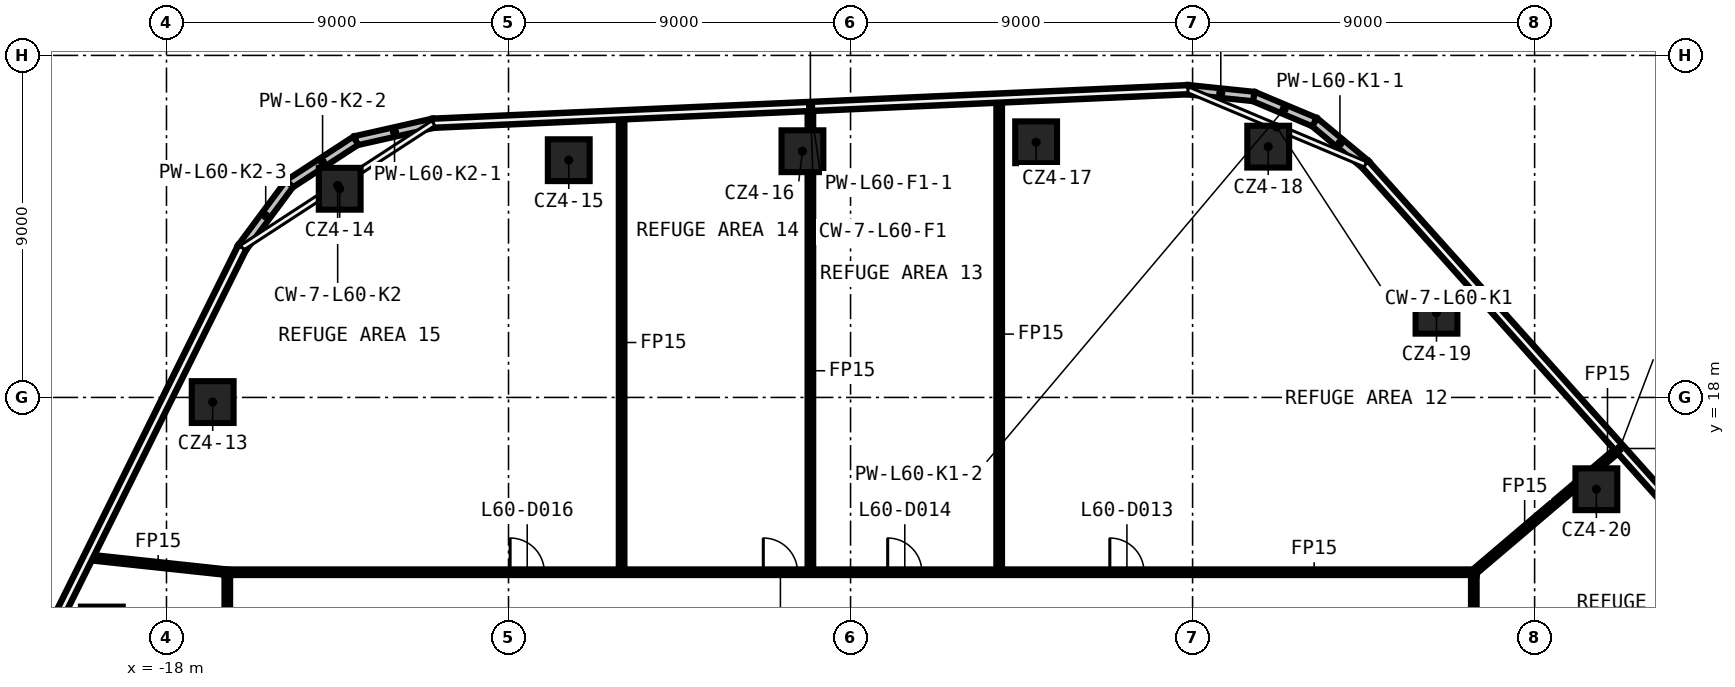
"""IFC4 building model, lengths in metres.
Left out: names, types, materials, properties, quantities, classifications, styles, units other than length and angle.
Written with IfcOpenShell. Run it as: python <this file> out.ifc"""

import sys

from ifc_helpers import new_model, si_unit, direction, frame, frame_2d, origin, origin_2d, place, context, subcontext, project, spatial, rectangle, extrude, element, fill, save


model = new_model("IFC4")
c1 = context("Model", 3, precision=1e-05, world=origin(), true_north=direction((0.0, 1.0)))
c2 = subcontext(c1, "Body", "Model", "MODEL_VIEW")
j1 = project(units=[si_unit("LENGTHUNIT", "METRE"), si_unit("PLANEANGLEUNIT", "RADIAN")], contexts=[c1])
p1 = place(None, origin())
s1 = spatial("IfcSite", under=j1, at=p1, CompositionType="ELEMENT")
p2 = place(p1, origin())
s2 = spatial("IfcBuilding", under=s1, at=p2, CompositionType="ELEMENT")
p3 = place(p2, frame((0.0, 0.0, 283.2)))
s3 = spatial("IfcBuildingStorey", under=s2, at=p3, CompositionType="ELEMENT", Elevation=283.2)
for number, where, z_axis, x_axis in (
    (1, (-19.702, 11.945, 0.0), (0.0, 0.0, 1.0), (1.0, 0.0, 0.0)),
    (2, (-16.784, 17.878, 0.0), (0.0, 0.0, 1.0), (1.0, 0.0, 0.0)),
    (3, (-13.442, 23.491, 0.0), (0.0, 0.0, 1.0), (1.0, 0.0, 0.0)),
    (4, (-7.415, 24.243, 0.0), (0.0, 0.0, 1.0), (1.0, 0.0, 0.0)),
    (5, (-1.266, 24.479, 0.0), (0.0, 0.0, 1.0), (1.0, 0.0, 0.0)),
    (6, (4.883, 24.714, 0.0), (0.0, 0.0, 1.0), (1.0, 0.0, 0.0)),
    (7, (10.99, 24.599, 0.0), (0.0, 0.0, 1.0), (1.0, 0.0, 0.0)),
    (8, (15.418, 20.229, 0.0), (0.0, 0.0, 1.0), (1.0, 0.0, 0.0)),
    (9, (19.625, 15.584, 0.0), (0.0, 0.0, 1.0), (1.0, 0.0, 0.0)),
):
    element("IfcColumn", number, at=place(p3, frame(where, z_axis=z_axis, x_axis=x_axis)), inside=s3, PredefinedType="COLUMN", context=c2, shape_type="SweptSolid", body=[
        extrude(rectangle(XDim=1.1, YDim=1.1, at=origin_2d()), origin(), (0.0, 0.0, 1.0), 5.55),
    ])
p4 = place(p3, frame((-16.475, 13.4, 0.0), z_axis=(0.0, 0.0, 1.0), x_axis=(1.0, 0.0, 0.0)))
e10 = element("IfcWall", 10, at=p4, inside=s3, PredefinedType="PARTITIONING", context=c2, shape_type="SweptSolid", body=[
    extrude(rectangle(XDim=32.95, YDim=0.15, at=frame_2d((16.475, 0.0))), origin(), (0.0, 0.0, 1.0), 5.55),
])
p5 = place(p4, frame((23.297, 0.0, 0.0)))
e11 = element("IfcOpeningElement", 11, at=p5, cuts=e10, PredefinedType="OPENING", context=c2, shape_type="SweptSolid", body=[
    extrude(rectangle(XDim=0.9, YDim=2.1, at=frame_2d((0.45, 1.05))), frame((0.0, 0.085, 0.0), z_axis=(0.0, -1.0, 0.0), x_axis=(1.0, 0.0, 0.0)), (0.0, 0.0, 1.0), 0.17),
])
p6 = place(p4, frame((17.452, 0.0, 0.0)))
e12 = element("IfcOpeningElement", 12, at=p6, cuts=e10, PredefinedType="OPENING", context=c2, shape_type="SweptSolid", body=[
    extrude(rectangle(XDim=0.9, YDim=2.1, at=frame_2d((0.45, 1.05))), frame((0.0, 0.085, 0.0), z_axis=(0.0, -1.0, 0.0), x_axis=(1.0, 0.0, 0.0)), (0.0, 0.0, 1.0), 0.17),
])
p7 = place(p4, frame((14.179, 0.0, 0.0)))
e13 = element("IfcOpeningElement", 13, at=p7, cuts=e10, PredefinedType="OPENING", context=c2, shape_type="SweptSolid", body=[
    extrude(rectangle(XDim=0.9, YDim=2.1, at=frame_2d((0.45, 1.05))), frame((0.0, 0.085, 0.0), z_axis=(0.0, -1.0, 0.0), x_axis=(1.0, 0.0, 0.0)), (0.0, 0.0, 1.0), 0.17),
])
p8 = place(p4, frame((7.517, 0.0, 0.0)))
e14 = element("IfcOpeningElement", 14, at=p8, cuts=e10, PredefinedType="OPENING", context=c2, shape_type="SweptSolid", body=[
    extrude(rectangle(XDim=0.9, YDim=2.1, at=frame_2d((0.45, 1.05))), frame((0.0, 0.085, 0.0), z_axis=(0.0, -1.0, 0.0), x_axis=(1.0, 0.0, 0.0)), (0.0, 0.0, 1.0), 0.17),
])
p9 = place(p3, frame((16.4, 13.4, 0.0), z_axis=(0.0, 0.0, 1.0), x_axis=(0.761994228547, 0.647583813618, 0.0)))
e15 = element("IfcWall", 15, at=p9, inside=s3, PredefinedType="PARTITIONING", context=c2, shape_type="SweptSolid", body=[
    extrude(rectangle(XDim=3.51, YDim=0.15, at=frame_2d((1.755, 0.0))), origin(), (0.0, 0.0, 1.0), 5.55),
])
p10 = place(p3, frame((19.617, 16.134, 0.0), z_axis=(0.0, 0.0, 1.0), x_axis=(0.762069188158, 0.647495600341, 0.0)))
e16 = element("IfcWall", 16, at=p10, inside=s3, PredefinedType="PARTITIONING", context=c2, shape_type="SweptSolid", body=[
    extrude(rectangle(XDim=0.788, YDim=0.15, at=frame_2d((0.394, 0.0))), origin(), (0.0, 0.0, 1.0), 5.55),
])
p11 = place(p3, frame((16.4, 13.325, 0.0), z_axis=(0.0, 0.0, 1.0), x_axis=(0.0, -1.0, 0.0)))
e17 = element("IfcWall", 17, at=p11, inside=s3, PredefinedType="PARTITIONING", context=c2, shape_type="SweptSolid", body=[
    extrude(rectangle(XDim=26.65, YDim=0.15, at=frame_2d((13.325, 0.0))), origin(), (0.0, 0.0, 1.0), 5.55),
])
p12 = place(p11, frame((20.273, 0.0, 0.0)))
e18 = element("IfcOpeningElement", 18, at=p12, cuts=e17, PredefinedType="OPENING", context=c2, shape_type="SweptSolid", body=[
    extrude(rectangle(XDim=0.9, YDim=2.1, at=frame_2d((0.45, 1.05))), frame((0.0, 0.085, 0.0), z_axis=(0.0, -1.0, 0.0), x_axis=(1.0, 0.0, 0.0)), (0.0, 0.0, 1.0), 0.17),
])
p13 = place(p11, frame((16.375, 0.0, 0.0)))
e19 = element("IfcOpeningElement", 19, at=p13, cuts=e17, PredefinedType="OPENING", context=c2, shape_type="SweptSolid", body=[
    extrude(rectangle(XDim=0.9, YDim=2.1, at=frame_2d((0.45, 1.05))), frame((0.0, 0.085, 0.0), z_axis=(0.0, -1.0, 0.0), x_axis=(1.0, 0.0, 0.0)), (0.0, 0.0, 1.0), 0.17),
])
p14 = place(p11, frame((10.108, 0.0, 0.0)))
e20 = element("IfcOpeningElement", 20, at=p14, cuts=e17, PredefinedType="OPENING", context=c2, shape_type="SweptSolid", body=[
    extrude(rectangle(XDim=0.9, YDim=2.1, at=frame_2d((0.45, 1.05))), frame((0.0, 0.085, 0.0), z_axis=(0.0, -1.0, 0.0), x_axis=(1.0, 0.0, 0.0)), (0.0, 0.0, 1.0), 0.17),
])
p15 = place(p11, frame((2.579, 0.0, 0.0)))
e21 = element("IfcOpeningElement", 21, at=p15, cuts=e17, PredefinedType="OPENING", context=c2, shape_type="SweptSolid", body=[
    extrude(rectangle(XDim=0.9, YDim=2.1, at=frame_2d((0.45, 1.05))), frame((0.0, 0.085, 0.0), z_axis=(0.0, -1.0, 0.0), x_axis=(1.0, 0.0, 0.0)), (0.0, 0.0, 1.0), 0.17),
])
p16 = place(p3, frame((3.911, 13.475, 0.0), z_axis=(0.0, 0.0, 1.0), x_axis=(0.0, 1.0, 0.0)))
e22 = element("IfcWall", 22, at=p16, inside=s3, PredefinedType="PARTITIONING", context=c2, shape_type="SweptSolid", body=[
    extrude(rectangle(XDim=12.383, YDim=0.15, at=frame_2d((6.191, 0.0))), origin(), (0.0, 0.0, 1.0), 5.55),
])
p17 = place(p3, frame((-1.057, 13.475, 0.0), z_axis=(0.0, 0.0, 1.0), x_axis=(0.0, 1.0, 0.0)))
e23 = element("IfcWall", 23, at=p17, inside=s3, PredefinedType="PARTITIONING", context=c2, shape_type="SweptSolid", body=[
    extrude(rectangle(XDim=10.454, YDim=0.15, at=frame_2d((5.227, 0.0))), origin(), (0.0, 0.0, 1.0), 5.55),
])
p18 = place(p3, frame((-1.057, 25.029, 0.0), z_axis=(0.0, 0.0, 1.0), x_axis=(0.0, 1.0, 0.0)))
e24 = element("IfcWall", 24, at=p18, inside=s3, PredefinedType="PARTITIONING", context=c2, shape_type="SweptSolid", body=[
    extrude(rectangle(XDim=0.608, YDim=0.15, at=frame_2d((0.304, 0.0))), origin(), (0.0, 0.0, 1.0), 5.55),
])
p19 = place(p3, frame((-6.024, 13.475, 0.0), z_axis=(0.0, 0.0, 1.0), x_axis=(0.0, 1.0, 0.0)))
e25 = element("IfcWall", 25, at=p19, inside=s3, PredefinedType="PARTITIONING", context=c2, shape_type="SweptSolid", body=[
    extrude(rectangle(XDim=11.941, YDim=0.15, at=frame_2d((5.97, 0.0))), origin(), (0.0, 0.0, 1.0), 5.55),
])
p20 = place(p3, frame((-16.4, -13.325, 0.0), z_axis=(0.0, 0.0, 1.0), x_axis=(0.0, 1.0, 0.0)))
e26 = element("IfcWall", 26, at=p20, inside=s3, PredefinedType="PARTITIONING", context=c2, shape_type="SweptSolid", body=[
    extrude(rectangle(XDim=26.65, YDim=0.15, at=frame_2d((13.325, 0.0))), origin(), (0.0, 0.0, 1.0), 5.55),
])
p21 = place(p20, frame((10.903, 0.0, 0.0)))
e27 = element("IfcOpeningElement", 27, at=p21, cuts=e26, PredefinedType="OPENING", context=c2, shape_type="SweptSolid", body=[
    extrude(rectangle(XDim=0.9, YDim=2.1, at=frame_2d((0.45, 1.05))), frame((0.0, 0.085, 0.0), z_axis=(0.0, -1.0, 0.0), x_axis=(1.0, 0.0, 0.0)), (0.0, 0.0, 1.0), 0.17),
])
p22 = place(p20, frame((3.885, 0.0, 0.0)))
e28 = element("IfcOpeningElement", 28, at=p22, cuts=e26, PredefinedType="OPENING", context=c2, shape_type="SweptSolid", body=[
    extrude(rectangle(XDim=0.9, YDim=2.1, at=frame_2d((0.45, 1.05))), frame((0.0, 0.085, 0.0), z_axis=(0.0, -1.0, 0.0), x_axis=(1.0, 0.0, 0.0)), (0.0, 0.0, 1.0), 0.17),
])
p23 = place(p20, frame((22.384, 0.0, 0.0)))
e29 = element("IfcOpeningElement", 29, at=p23, cuts=e26, PredefinedType="OPENING", context=c2, shape_type="SweptSolid", body=[
    extrude(rectangle(XDim=0.9, YDim=2.1, at=frame_2d((0.45, 1.05))), frame((0.0, 0.085, 0.0), z_axis=(0.0, -1.0, 0.0), x_axis=(1.0, 0.0, 0.0)), (0.0, 0.0, 1.0), 0.17),
])
p24 = place(p20, frame((15.37, 0.0, 0.0)))
e30 = element("IfcOpeningElement", 30, at=p24, cuts=e26, PredefinedType="OPENING", context=c2, shape_type="SweptSolid", body=[
    extrude(rectangle(XDim=0.9, YDim=2.1, at=frame_2d((0.45, 1.05))), frame((0.0, 0.085, 0.0), z_axis=(0.0, -1.0, 0.0), x_axis=(1.0, 0.0, 0.0)), (0.0, 0.0, 1.0), 0.17),
])
p25 = place(p3, frame((-20.039, 13.791, 0.0), z_axis=(0.0, 0.0, 1.0), x_axis=(0.994280601319, -0.106799278277, 0.0)))
e31 = element("IfcWall", 31, at=p25, inside=s3, PredefinedType="PARTITIONING", context=c2, shape_type="SweptSolid", body=[
    extrude(rectangle(XDim=3.66, YDim=0.15, at=frame_2d((1.83, 0.0))), origin(), (0.0, 0.0, 1.0), 5.55),
])
p26 = place(p3, frame((26.921, 9.18, 0.0), z_axis=(0.0, 0.0, 1.0), x_axis=(-0.666670693315, 0.745352390936, 0.0)))
e32 = element("IfcWall", 32, at=p26, inside=s3, PredefinedType="SOLIDWALL", context=c2, shape_type="SweptSolid", body=[
    extrude(rectangle(XDim=20.06, YDim=0.25, at=frame_2d((10.03, 0.0))), origin(), (0.0, 0.0, 1.0), 5.55),
])
p27 = place(p3, frame((13.548, 24.132, 0.0), z_axis=(0.0, 0.0, 1.0), x_axis=(-0.769001728145, 0.639246698943, 0.0)))
e33 = element("IfcWall", 33, at=p27, inside=s3, PredefinedType="SOLIDWALL", context=c2, shape_type="SweptSolid", body=[
    extrude(rectangle(XDim=1.742, YDim=0.25, at=frame_2d((0.871, 0.0))), origin(), (0.0, 0.0, 1.0), 5.55),
])
p28 = place(p3, frame((12.208, 25.246, 0.0), z_axis=(0.0, 0.0, 1.0), x_axis=(-0.921730707326, 0.387830508304, 0.0)))
e34 = element("IfcWall", 34, at=p28, inside=s3, PredefinedType="SOLIDWALL", context=c2, shape_type="SweptSolid", body=[
    extrude(rectangle(XDim=1.735, YDim=0.25, at=frame_2d((0.867, 0.0))), origin(), (0.0, 0.0, 1.0), 5.55),
])
p29 = place(p3, frame((10.609, 25.919, 0.0), z_axis=(0.0, 0.0, 1.0), x_axis=(-0.99468140225, 0.102999553487, 0.0)))
e35 = element("IfcWall", 35, at=p29, inside=s3, PredefinedType="SOLIDWALL", context=c2, shape_type="SweptSolid", body=[
    extrude(rectangle(XDim=1.742, YDim=0.25, at=frame_2d((0.871, 0.0))), origin(), (0.0, 0.0, 1.0), 5.55),
])
p30 = place(p3, frame((8.876, 26.098, 0.0), z_axis=(0.0, 0.0, 1.0), x_axis=(-0.999012910202, -0.044420774975, 0.0)))
e36 = element("IfcWall", 36, at=p30, inside=s3, PredefinedType="SOLIDWALL", context=c2, shape_type="SweptSolid", body=[
    extrude(rectangle(XDim=19.874, YDim=0.25, at=frame_2d((9.937, 0.0))), origin(), (0.0, 0.0, 1.0), 5.55),
])
p31 = place(p3, frame((-10.979, 25.216, 0.0), z_axis=(0.0, 0.0, 1.0), x_axis=(-0.975459598357, -0.220178500251, 0.0)))
e37 = element("IfcWall", 37, at=p31, inside=s3, PredefinedType="SOLIDWALL", context=c2, shape_type="SweptSolid", body=[
    extrude(rectangle(XDim=2.092, YDim=0.25, at=frame_2d((1.046, 0.0))), origin(), (0.0, 0.0, 1.0), 5.55),
])
p32 = place(p3, frame((-13.02, 24.755, 0.0), z_axis=(0.0, 0.0, 1.0), x_axis=(-0.838111469167, -0.545499005729, 0.0)))
e38 = element("IfcWall", 38, at=p32, inside=s3, PredefinedType="SOLIDWALL", context=c2, shape_type="SweptSolid", body=[
    extrude(rectangle(XDim=2.083, YDim=0.25, at=frame_2d((1.042, 0.0))), origin(), (0.0, 0.0, 1.0), 5.55),
])
p33 = place(p3, frame((-14.766, 23.618, 0.0), z_axis=(0.0, 0.0, 1.0), x_axis=(-0.596147857174, -0.80287466792, 0.0)))
e39 = element("IfcWall", 39, at=p33, inside=s3, PredefinedType="SOLIDWALL", context=c2, shape_type="SweptSolid", body=[
    extrude(rectangle(XDim=2.093, YDim=0.25, at=frame_2d((1.046, 0.0))), origin(), (0.0, 0.0, 1.0), 5.55),
])
p34 = place(p3, frame((-16.013, 21.938, 0.0), z_axis=(0.0, 0.0, 1.0), x_axis=(-0.444956387573, -0.895552239212, 0.0)))
e40 = element("IfcWall", 40, at=p34, inside=s3, PredefinedType="SOLIDWALL", context=c2, shape_type="SweptSolid", body=[
    extrude(rectangle(XDim=27.404, YDim=0.25, at=frame_2d((13.702, 0.0))), origin(), (0.0, 0.0, 1.0), 5.55),
])
p35 = place(p5, origin())
e41 = element("IfcDoor", 41, at=p35, inside=s3, OperationType="SINGLE_SWING_RIGHT", PredefinedType="DOOR", context=c2, shape_type="SweptSolid", body=[
    extrude(rectangle(XDim=0.9, YDim=2.1, at=frame_2d((0.45, 1.05))), frame((0.0, 0.025, 0.0), z_axis=(0.0, -1.0, 0.0), x_axis=(1.0, 0.0, 0.0)), (0.0, 0.0, 1.0), 0.05),
])
fill(e11, e41)
p36 = place(p6, origin())
e42 = element("IfcDoor", 42, at=p36, inside=s3, OperationType="SINGLE_SWING_LEFT", PredefinedType="DOOR", context=c2, shape_type="SweptSolid", body=[
    extrude(rectangle(XDim=0.9, YDim=2.1, at=frame_2d((0.45, 1.05))), frame((0.0, 0.025, 0.0), z_axis=(0.0, -1.0, 0.0), x_axis=(1.0, 0.0, 0.0)), (0.0, 0.0, 1.0), 0.05),
])
fill(e12, e42)
p37 = place(p7, origin())
e43 = element("IfcDoor", 43, at=p37, inside=s3, OperationType="SINGLE_SWING_RIGHT", PredefinedType="DOOR", context=c2, shape_type="SweptSolid", body=[
    extrude(rectangle(XDim=0.9, YDim=2.1, at=frame_2d((0.45, 1.05))), frame((0.0, 0.025, 0.0), z_axis=(0.0, -1.0, 0.0), x_axis=(1.0, 0.0, 0.0)), (0.0, 0.0, 1.0), 0.05),
])
fill(e13, e43)
p38 = place(p8, origin())
e44 = element("IfcDoor", 44, at=p38, inside=s3, OperationType="SINGLE_SWING_LEFT", PredefinedType="DOOR", context=c2, shape_type="SweptSolid", body=[
    extrude(rectangle(XDim=0.9, YDim=2.1, at=frame_2d((0.45, 1.05))), frame((0.0, 0.025, 0.0), z_axis=(0.0, -1.0, 0.0), x_axis=(1.0, 0.0, 0.0)), (0.0, 0.0, 1.0), 0.05),
])
fill(e14, e44)
save(model, sys.argv[1])
